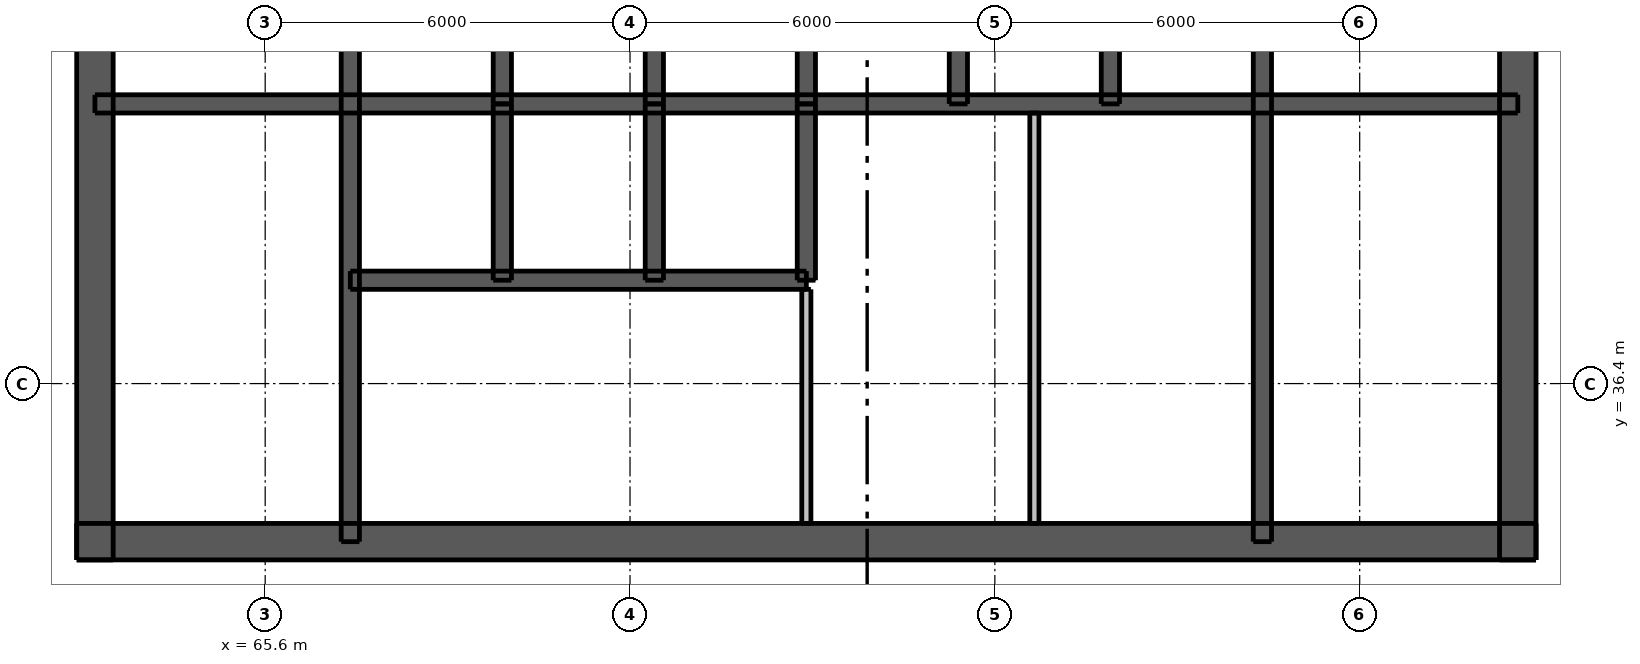
"""IFC4 building model, lengths in metres.
Left out: names, types, materials, properties, quantities, classifications, styles, units other than length and angle.
Written with IfcOpenShell. Run it as: python <this file> out.ifc"""

import sys

from ifc_helpers import new_model, si_unit, direction, frame, frame_2d, origin, place, context, subcontext, project, spatial, rectangle, extrude, element, fill, save


model = new_model("IFC4")
c1 = context("Model", 3, precision=1e-05, world=origin(), true_north=direction((0.0, 1.0)))
c2 = subcontext(c1, "Body", "Model", "MODEL_VIEW")
j1 = project(units=[si_unit("LENGTHUNIT", "METRE"), si_unit("PLANEANGLEUNIT", "RADIAN")], contexts=[c1])
p1 = place(None, origin())
s1 = spatial("IfcSite", under=j1, at=p1, CompositionType="ELEMENT")
p2 = place(p1, origin())
s2 = spatial("IfcBuilding", under=s1, at=p2, CompositionType="ELEMENT")
p3 = place(p2, frame((0.0, 0.0, 223.3)))
s3 = spatial("IfcBuildingStorey", under=s2, at=p3, CompositionType="ELEMENT", Elevation=223.3)
p4 = place(p3, frame((62.5, 33.8, 0.0), z_axis=(0.0, 0.0, 1.0), x_axis=(1.0, 0.0, 0.0)))
e1 = element("IfcWall", 1, at=p4, inside=s3, PredefinedType="SHEAR", context=c2, shape_type="SweptSolid", body=[
    extrude(rectangle(XDim=24.0, YDim=0.6, at=frame_2d((12.0, 0.0))), origin(), (0.0, 0.0, 1.0), 3.05),
])
p5 = place(p4, frame((1.925, 0.0, 0.0)))
e2 = element("IfcOpeningElement", 2, at=p5, cuts=e1, PredefinedType="OPENING", context=c2, shape_type="SweptSolid", body=[
    extrude(rectangle(XDim=1.1, YDim=2.1, at=frame_2d((0.55, 1.05))), frame((0.0, 0.31, 0.0), z_axis=(0.0, -1.0, 0.0), x_axis=(1.0, 0.0, 0.0)), (0.0, 0.0, 1.0), 0.62),
])
p6 = place(p4, frame((20.975, 0.0, 0.0)))
e3 = element("IfcOpeningElement", 3, at=p6, cuts=e1, PredefinedType="OPENING", context=c2, shape_type="SweptSolid", body=[
    extrude(rectangle(XDim=1.1, YDim=2.1, at=frame_2d((0.55, 1.05))), frame((0.0, 0.31, 0.0), z_axis=(0.0, -1.0, 0.0), x_axis=(1.0, 0.0, 0.0)), (0.0, 0.0, 1.0), 0.62),
])
p7 = place(p4, frame((8.0, 0.0, 0.0)))
e4 = element("IfcOpeningElement", 4, at=p7, cuts=e1, PredefinedType="OPENING", context=c2, shape_type="SweptSolid", body=[
    extrude(rectangle(XDim=1.1, YDim=2.1, at=frame_2d((0.55, 1.05))), frame((0.0, 0.31, 0.0), z_axis=(0.0, -1.0, 0.0), x_axis=(1.0, 0.0, 0.0)), (0.0, 0.0, 1.0), 0.62),
])
p8 = place(p4, frame((13.5, 0.0, 0.0)))
e5 = element("IfcOpeningElement", 5, at=p8, cuts=e1, PredefinedType="OPENING", context=c2, shape_type="SweptSolid", body=[
    extrude(rectangle(XDim=0.9, YDim=2.1, at=frame_2d((0.45, 1.05))), frame((0.0, 0.31, 0.0), z_axis=(0.0, -1.0, 0.0), x_axis=(1.0, 0.0, 0.0)), (0.0, 0.0, 1.0), 0.62),
])
p9 = place(p4, frame((17.1, 0.0, 0.0)))
e6 = element("IfcOpeningElement", 6, at=p9, cuts=e1, PredefinedType="OPENING", context=c2, shape_type="SweptSolid", body=[
    extrude(rectangle(XDim=0.9, YDim=2.1, at=frame_2d((0.45, 1.05))), frame((0.0, 0.31, 0.0), z_axis=(0.0, -1.0, 0.0), x_axis=(1.0, 0.0, 0.0)), (0.0, 0.0, 1.0), 0.62),
])
p10 = place(p3, frame((62.8, 33.5, 0.0), z_axis=(0.0, 0.0, 1.0), x_axis=(0.0, 1.0, 0.0)))
e7 = element("IfcWall", 7, at=p10, inside=s3, PredefinedType="SHEAR", context=c2, shape_type="SweptSolid", body=[
    extrude(rectangle(XDim=24.0, YDim=0.6, at=frame_2d((12.0, 0.0))), origin(), (0.0, 0.0, 1.0), 3.05),
])
p11 = place(p10, frame((11.2, 0.0, 0.0)))
e8 = element("IfcOpeningElement", 8, at=p11, cuts=e7, PredefinedType="OPENING", context=c2, shape_type="SweptSolid", body=[
    extrude(rectangle(XDim=1.6, YDim=2.1, at=frame_2d((0.8, 1.05))), frame((0.0, 0.31, 0.0), z_axis=(0.0, -1.0, 0.0), x_axis=(1.0, 0.0, 0.0)), (0.0, 0.0, 1.0), 0.62),
])
p12 = place(p3, frame((86.2, 33.5, 0.0), z_axis=(0.0, 0.0, 1.0), x_axis=(0.0, 1.0, 0.0)))
e9 = element("IfcWall", 9, at=p12, inside=s3, PredefinedType="SHEAR", context=c2, shape_type="SweptSolid", body=[
    extrude(rectangle(XDim=24.0, YDim=0.6, at=frame_2d((12.0, 0.0))), origin(), (0.0, 0.0, 1.0), 3.05),
])
p13 = place(p12, frame((11.2, 0.0, 0.0)))
e10 = element("IfcOpeningElement", 10, at=p13, cuts=e9, PredefinedType="OPENING", context=c2, shape_type="SweptSolid", body=[
    extrude(rectangle(XDim=1.6, YDim=2.1, at=frame_2d((0.8, 1.05))), frame((0.0, 0.31, 0.0), z_axis=(0.0, -1.0, 0.0), x_axis=(1.0, 0.0, 0.0)), (0.0, 0.0, 1.0), 0.62),
])
p14 = place(p3, frame((62.8, 41.0, 0.0), z_axis=(0.0, 0.0, 1.0), x_axis=(1.0, 0.0, 0.0)))
e11 = element("IfcWall", 11, at=p14, inside=s3, PredefinedType="SHEAR", context=c2, shape_type="SweptSolid", body=[
    extrude(rectangle(XDim=23.4, YDim=0.3, at=frame_2d((11.7, 0.0))), origin(), (0.0, 0.0, 1.0), 3.05),
])
p15 = place(p3, frame((67.0, 33.8, 0.0), z_axis=(0.0, 0.0, 1.0), x_axis=(0.0, 1.0, 0.0)))
e12 = element("IfcWall", 12, at=p15, inside=s3, PredefinedType="SHEAR", context=c2, shape_type="SweptSolid", body=[
    extrude(rectangle(XDim=10.1, YDim=0.3, at=frame_2d((5.05, 0.0))), origin(), (0.0, 0.0, 1.0), 3.05),
])
p16 = place(p15, frame((0.5, 0.0, 0.0)))
e13 = element("IfcOpeningElement", 13, at=p16, cuts=e12, PredefinedType="OPENING", context=c2, shape_type="SweptSolid", body=[
    extrude(rectangle(XDim=1.1, YDim=2.1, at=frame_2d((0.55, 1.05))), frame((0.0, 0.16, 0.0), z_axis=(0.0, -1.0, 0.0), x_axis=(1.0, 0.0, 0.0)), (0.0, 0.0, 1.0), 0.32),
])
p17 = place(p3, frame((82.0, 33.8, 0.0), z_axis=(0.0, 0.0, 1.0), x_axis=(0.0, 1.0, 0.0)))
e14 = element("IfcWall", 14, at=p17, inside=s3, PredefinedType="SHEAR", context=c2, shape_type="SweptSolid", body=[
    extrude(rectangle(XDim=10.1, YDim=0.3, at=frame_2d((5.05, 0.0))), origin(), (0.0, 0.0, 1.0), 3.05),
])
for number, where, z_axis, x_axis in (
    (15, (69.5, 41.0, 0.0), (0.0, 0.0, 1.0), (0.0, 1.0, 0.0)),
    (16, (72.0, 41.0, 0.0), (0.0, 0.0, 1.0), (0.0, 1.0, 0.0)),
    (17, (74.5, 41.0, 0.0), (0.0, 0.0, 1.0), (0.0, 1.0, 0.0)),
    (18, (77.0, 41.0, 0.0), (0.0, 0.0, 1.0), (0.0, 1.0, 0.0)),
    (19, (79.5, 41.0, 0.0), (0.0, 0.0, 1.0), (0.0, 1.0, 0.0)),
):
    element("IfcWall", number, at=place(p3, frame(where, z_axis=z_axis, x_axis=x_axis)), inside=s3, PredefinedType="SHEAR", context=c2, shape_type="SweptSolid", body=[
        extrude(rectangle(XDim=2.9, YDim=0.3, at=frame_2d((1.45, 0.0))), origin(), (0.0, 0.0, 1.0), 3.05),
    ])
p18 = place(p3, frame((67.0, 38.1, 0.0), z_axis=(0.0, 0.0, 1.0), x_axis=(1.0, 0.0, 0.0)))
e20 = element("IfcWall", 20, at=p18, inside=s3, PredefinedType="SHEAR", context=c2, shape_type="SweptSolid", body=[
    extrude(rectangle(XDim=7.5, YDim=0.3, at=frame_2d((3.75, 0.0))), origin(), (0.0, 0.0, 1.0), 3.05),
])
p19 = place(p18, frame((0.7, 0.0, 0.0)))
e21 = element("IfcOpeningElement", 21, at=p19, cuts=e20, PredefinedType="OPENING", context=c2, shape_type="SweptSolid", body=[
    extrude(rectangle(XDim=1.1, YDim=2.1, at=frame_2d((0.55, 1.05))), frame((0.0, 0.16, 0.0), z_axis=(0.0, -1.0, 0.0), x_axis=(1.0, 0.0, 0.0)), (0.0, 0.0, 1.0), 0.32),
])
p20 = place(p18, frame((3.2, 0.0, 0.0)))
e22 = element("IfcOpeningElement", 22, at=p20, cuts=e20, PredefinedType="OPENING", context=c2, shape_type="SweptSolid", body=[
    extrude(rectangle(XDim=1.1, YDim=2.1, at=frame_2d((0.55, 1.05))), frame((0.0, 0.16, 0.0), z_axis=(0.0, -1.0, 0.0), x_axis=(1.0, 0.0, 0.0)), (0.0, 0.0, 1.0), 0.32),
])
p21 = place(p18, frame((5.65, 0.0, 0.0)))
e23 = element("IfcOpeningElement", 23, at=p21, cuts=e20, PredefinedType="OPENING", context=c2, shape_type="SweptSolid", body=[
    extrude(rectangle(XDim=1.2, YDim=2.1, at=frame_2d((0.6, 1.05))), frame((0.0, 0.16, 0.0), z_axis=(0.0, -1.0, 0.0), x_axis=(1.0, 0.0, 0.0)), (0.0, 0.0, 1.0), 0.32),
])
for number, where, z_axis, x_axis in (
    (24, (69.5, 38.1, 0.0), (0.0, 0.0, 1.0), (0.0, 1.0, 0.0)),
    (25, (72.0, 38.1, 0.0), (0.0, 0.0, 1.0), (0.0, 1.0, 0.0)),
    (26, (74.5, 38.1, 0.0), (0.0, 0.0, 1.0), (0.0, 1.0, 0.0)),
):
    element("IfcWall", number, at=place(p3, frame(where, z_axis=z_axis, x_axis=x_axis)), inside=s3, PredefinedType="SHEAR", context=c2, shape_type="SweptSolid", body=[
        extrude(rectangle(XDim=2.9, YDim=0.3, at=frame_2d((1.45, 0.0))), origin(), (0.0, 0.0, 1.0), 3.05),
    ])
p22 = place(p3, frame((74.5, 34.1, 0.0), z_axis=(0.0, 0.0, 1.0), x_axis=(0.0, 1.0, 0.0)))
e27 = element("IfcWall", 27, at=p22, inside=s3, PredefinedType="PLUMBINGWALL", context=c2, shape_type="SweptSolid", body=[
    extrude(rectangle(XDim=3.85, YDim=0.15, at=frame_2d((1.925, 0.0))), origin(), (0.0, 0.0, 1.0), 3.05),
])
p23 = place(p3, frame((78.25, 34.1, 0.0), z_axis=(0.0, 0.0, 1.0), x_axis=(0.0, 1.0, 0.0)))
e28 = element("IfcWall", 28, at=p23, inside=s3, PredefinedType="PLUMBINGWALL", context=c2, shape_type="SweptSolid", body=[
    extrude(rectangle(XDim=6.75, YDim=0.15, at=frame_2d((3.375, 0.0))), origin(), (0.0, 0.0, 1.0), 3.05),
])
p24 = place(p5, origin())
e29 = element("IfcDoor", 29, at=p24, inside=s3, OperationType="SINGLE_SWING_LEFT", PredefinedType="DOOR", context=c2, shape_type="SweptSolid", body=[
    extrude(rectangle(XDim=1.1, YDim=2.1, at=frame_2d((0.55, 1.05))), frame((0.0, 0.288, 0.0), z_axis=(0.0, -1.0, 0.0), x_axis=(1.0, 0.0, 0.0)), (0.0, 0.0, 1.0), 0.05),
])
fill(e2, e29)
p25 = place(p6, origin())
e30 = element("IfcDoor", 30, at=p25, inside=s3, OperationType="SINGLE_SWING_RIGHT", PredefinedType="DOOR", context=c2, shape_type="SweptSolid", body=[
    extrude(rectangle(XDim=1.1, YDim=2.1, at=frame_2d((0.55, 1.05))), frame((0.0, 0.288, 0.0), z_axis=(0.0, -1.0, 0.0), x_axis=(1.0, 0.0, 0.0)), (0.0, 0.0, 1.0), 0.05),
])
fill(e3, e30)
p26 = place(p7, origin())
e31 = element("IfcDoor", 31, at=p26, inside=s3, OperationType="SINGLE_SWING_LEFT", PredefinedType="DOOR", context=c2, shape_type="SweptSolid", body=[
    extrude(rectangle(XDim=1.1, YDim=2.1, at=frame_2d((0.55, 1.05))), frame((0.0, 0.288, 0.0), z_axis=(0.0, -1.0, 0.0), x_axis=(1.0, 0.0, 0.0)), (0.0, 0.0, 1.0), 0.05),
])
fill(e4, e31)
p27 = place(p16, origin())
e32 = element("IfcDoor", 32, at=p27, inside=s3, OperationType="SINGLE_SWING_RIGHT", PredefinedType="DOOR", context=c2, shape_type="SweptSolid", body=[
    extrude(rectangle(XDim=1.1, YDim=2.1, at=frame_2d((0.55, 1.05))), frame((0.0, -0.087, 0.0), z_axis=(0.0, -1.0, 0.0), x_axis=(1.0, 0.0, 0.0)), (0.0, 0.0, 1.0), 0.05),
])
fill(e13, e32)
p28 = place(p8, origin())
e33 = element("IfcDoor", 33, at=p28, inside=s3, OperationType="SINGLE_SWING_LEFT", PredefinedType="DOOR", context=c2, shape_type="SweptSolid", body=[
    extrude(rectangle(XDim=0.9, YDim=2.1, at=frame_2d((0.45, 1.05))), frame((0.0, 0.288, 0.0), z_axis=(0.0, -1.0, 0.0), x_axis=(1.0, 0.0, 0.0)), (0.0, 0.0, 1.0), 0.05),
])
fill(e5, e33)
p29 = place(p9, origin())
e34 = element("IfcDoor", 34, at=p29, inside=s3, OperationType="SINGLE_SWING_LEFT", PredefinedType="DOOR", context=c2, shape_type="SweptSolid", body=[
    extrude(rectangle(XDim=0.9, YDim=2.1, at=frame_2d((0.45, 1.05))), frame((0.0, 0.288, 0.0), z_axis=(0.0, -1.0, 0.0), x_axis=(1.0, 0.0, 0.0)), (0.0, 0.0, 1.0), 0.05),
])
fill(e6, e34)
p30 = place(p19, origin())
e35 = element("IfcDoor", 35, at=p30, inside=s3, OperationType="DOUBLE_DOOR_SLIDING", PredefinedType="DOOR", context=c2, shape_type="SweptSolid", body=[
    extrude(rectangle(XDim=1.1, YDim=2.1, at=frame_2d((0.55, 1.05))), frame((0.0, 0.025, 0.0), z_axis=(0.0, -1.0, 0.0), x_axis=(1.0, 0.0, 0.0)), (0.0, 0.0, 1.0), 0.05),
])
fill(e21, e35)
p31 = place(p20, origin())
e36 = element("IfcDoor", 36, at=p31, inside=s3, OperationType="DOUBLE_DOOR_SLIDING", PredefinedType="DOOR", context=c2, shape_type="SweptSolid", body=[
    extrude(rectangle(XDim=1.1, YDim=2.1, at=frame_2d((0.55, 1.05))), frame((0.0, 0.025, 0.0), z_axis=(0.0, -1.0, 0.0), x_axis=(1.0, 0.0, 0.0)), (0.0, 0.0, 1.0), 0.05),
])
fill(e22, e36)
p32 = place(p21, origin())
e37 = element("IfcDoor", 37, at=p32, inside=s3, OperationType="DOUBLE_DOOR_SLIDING", PredefinedType="DOOR", context=c2, shape_type="SweptSolid", body=[
    extrude(rectangle(XDim=1.2, YDim=2.1, at=frame_2d((0.6, 1.05))), frame((0.0, 0.025, 0.0), z_axis=(0.0, -1.0, 0.0), x_axis=(1.0, 0.0, 0.0)), (0.0, 0.0, 1.0), 0.05),
])
fill(e23, e37)
save(model, sys.argv[1])
